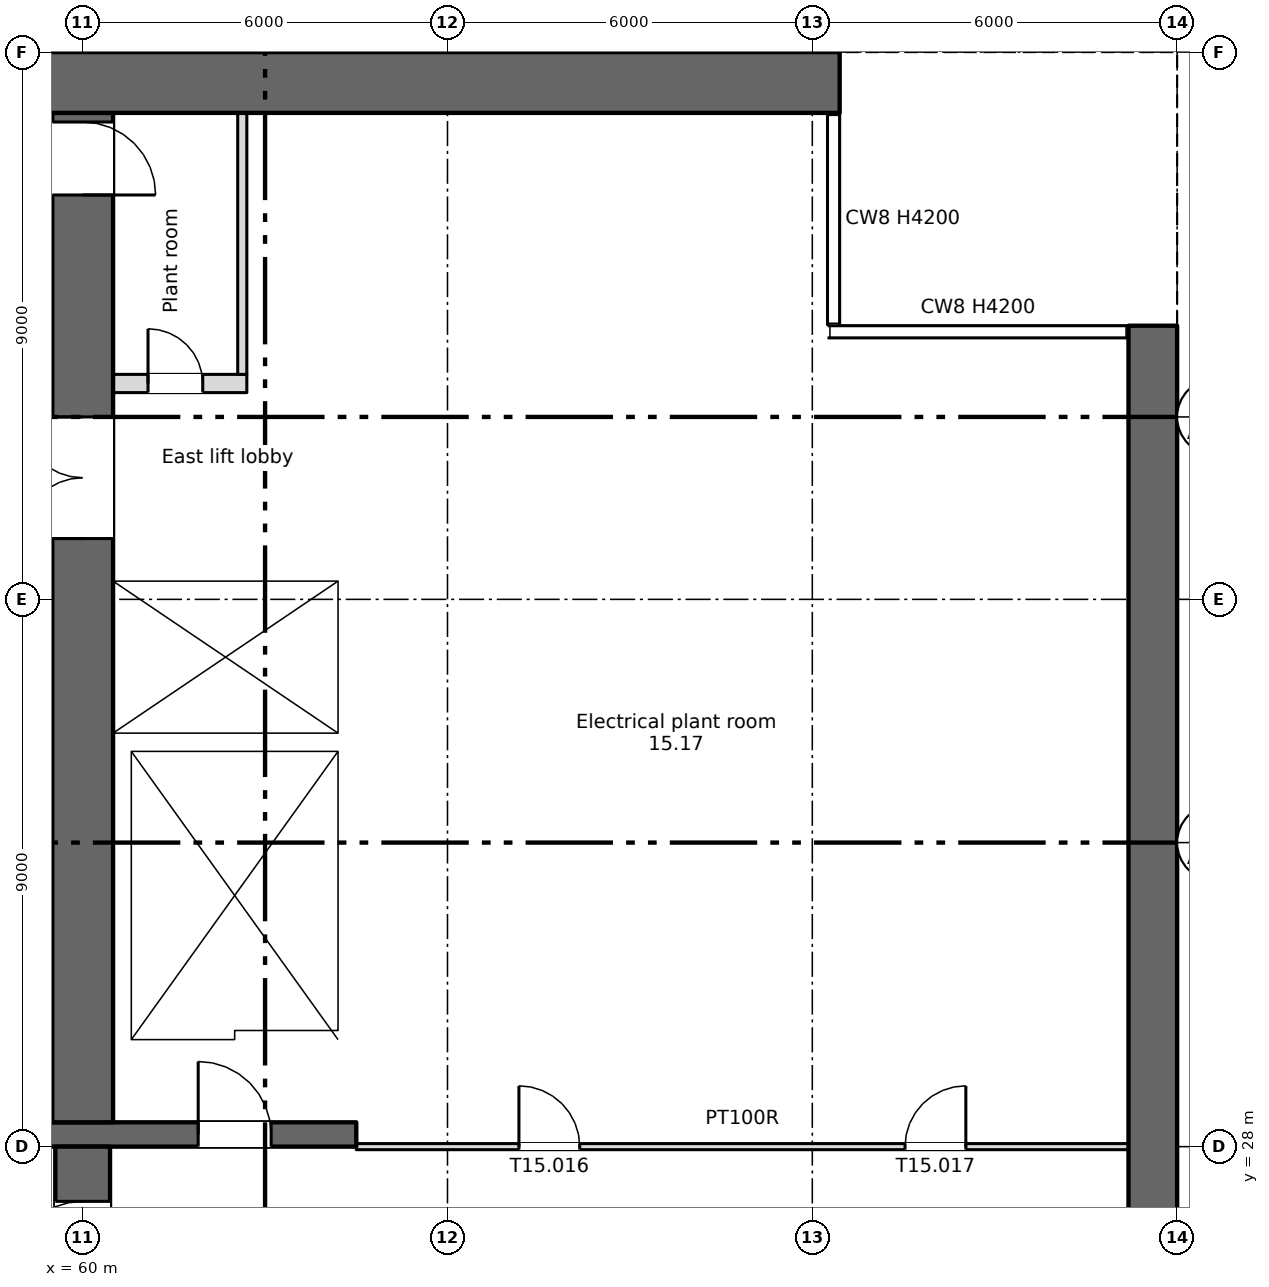
"""IFC4 building model, lengths in metres.
Left out: names, types, materials, properties, quantities, classifications, styles, units other than length and angle.
Written with IfcOpenShell. Run it as: python <this file> out.ifc"""

import sys

from ifc_helpers import new_model, si_unit, direction, frame, frame_2d, origin, place, context, subcontext, project, spatial, rectangle, extrude, element, fill, save


model = new_model("IFC4")
c1 = context("Model", 3, precision=1e-05, world=origin(), true_north=direction((0.0, 1.0)))
c2 = subcontext(c1, "Body", "Model", "MODEL_VIEW")
j1 = project(units=[si_unit("LENGTHUNIT", "METRE"), si_unit("PLANEANGLEUNIT", "RADIAN")], contexts=[c1])
p1 = place(None, origin())
s1 = spatial("IfcSite", under=j1, at=p1, CompositionType="ELEMENT")
p2 = place(p1, origin())
s2 = spatial("IfcBuilding", under=s1, at=p2, CompositionType="ELEMENT")
p3 = place(p2, frame((0.0, 0.0, 90.0)))
s3 = spatial("IfcBuildingStorey", under=s2, at=p3, CompositionType="ELEMENT", Elevation=90.0)
p4 = place(p3, frame((77.6, 4.5, 0.0), z_axis=(0.0, 0.0, 1.0), x_axis=(0.0, 1.0, 0.0)))
e1 = element("IfcWall", 1, at=p4, inside=s3, PredefinedType="SHEAR", context=c2, shape_type="SweptSolid", body=[
    extrude(rectangle(XDim=37.0, YDim=0.8, at=frame_2d((18.5, 0.0))), origin(), (0.0, 0.0, 1.0), 4.2),
])
p5 = place(p3, frame((5.55, 45.5, 0.0), z_axis=(0.0, 0.0, 1.0), x_axis=(1.0, 0.0, 0.0)))
e2 = element("IfcWall", 2, at=p5, inside=s3, PredefinedType="SHEAR", context=c2, shape_type="SweptSolid", body=[
    extrude(rectangle(XDim=66.9, YDim=1.0, at=frame_2d((33.45, 0.0))), origin(), (0.0, 0.0, 1.0), 4.2),
])
p6 = place(p3, frame((60.0, 1.4, 0.0), z_axis=(0.0, 0.0, 1.0), x_axis=(0.0, 1.0, 0.0)))
e3 = element("IfcWall", 3, at=p6, inside=s3, PredefinedType="SHEAR", context=c2, shape_type="SweptSolid", body=[
    extrude(rectangle(XDim=26.6, YDim=0.9, at=frame_2d((13.3, 0.0))), origin(), (0.0, 0.0, 1.0), 4.2),
])
p7 = place(p6, frame((24.5, 0.0, 0.0)))
e4 = element("IfcOpeningElement", 4, at=p7, cuts=e3, PredefinedType="OPENING", context=c2, shape_type="SweptSolid", body=[
    extrude(rectangle(XDim=1.2, YDim=2.1, at=frame_2d((0.6, 1.05))), frame((0.0, 0.46, 0.0), z_axis=(0.0, -1.0, 0.0), x_axis=(1.0, 0.0, 0.0)), (0.0, 0.0, 1.0), 0.92),
])
p8 = place(p3, frame((6.7, 28.2, 0.0), z_axis=(0.0, 0.0, 1.0), x_axis=(1.0, 0.0, 0.0)))
e5 = element("IfcWall", 5, at=p8, inside=s3, PredefinedType="SHEAR", context=c2, shape_type="SweptSolid", body=[
    extrude(rectangle(XDim=57.8, YDim=0.4, at=frame_2d((28.9, 0.0))), origin(), (0.0, 0.0, 1.0), 4.2),
])
p9 = place(p8, frame((13.85, 0.0, 0.0)))
e6 = element("IfcOpeningElement", 6, at=p9, cuts=e5, PredefinedType="OPENING", context=c2, shape_type="SweptSolid", body=[
    extrude(rectangle(XDim=0.9, YDim=2.1, at=frame_2d((0.45, 1.05))), frame((0.0, 0.21, 0.0), z_axis=(0.0, -1.0, 0.0), x_axis=(1.0, 0.0, 0.0)), (0.0, 0.0, 1.0), 0.42),
])
p10 = place(p8, frame((49.85, 0.0, 0.0)))
e7 = element("IfcOpeningElement", 7, at=p10, cuts=e5, PredefinedType="OPENING", context=c2, shape_type="SweptSolid", body=[
    extrude(rectangle(XDim=0.9, YDim=2.1, at=frame_2d((0.45, 1.05))), frame((0.0, 0.21, 0.0), z_axis=(0.0, -1.0, 0.0), x_axis=(1.0, 0.0, 0.0)), (0.0, 0.0, 1.0), 0.42),
])
p11 = place(p8, frame((1.35, 0.0, 0.0)))
e8 = element("IfcOpeningElement", 8, at=p11, cuts=e5, PredefinedType="OPENING", context=c2, shape_type="SweptSolid", body=[
    extrude(rectangle(XDim=0.9, YDim=2.1, at=frame_2d((0.45, 1.05))), frame((0.0, 0.21, 0.0), z_axis=(0.0, -1.0, 0.0), x_axis=(1.0, 0.0, 0.0)), (0.0, 0.0, 1.0), 0.42),
])
p12 = place(p8, frame((4.7, 0.0, 0.0)))
e9 = element("IfcOpeningElement", 9, at=p12, cuts=e5, PredefinedType="OPENING", context=c2, shape_type="SweptSolid", body=[
    extrude(rectangle(XDim=1.2, YDim=2.1, at=frame_2d((0.6, 1.05))), frame((0.0, 0.21, 0.0), z_axis=(0.0, -1.0, 0.0), x_axis=(1.0, 0.0, 0.0)), (0.0, 0.0, 1.0), 0.42),
])
p13 = place(p8, frame((31.7, 0.0, 0.0)))
e10 = element("IfcOpeningElement", 10, at=p13, cuts=e5, PredefinedType="OPENING", context=c2, shape_type="SweptSolid", body=[
    extrude(rectangle(XDim=1.2, YDim=2.1, at=frame_2d((0.6, 1.05))), frame((0.0, 0.21, 0.0), z_axis=(0.0, -1.0, 0.0), x_axis=(1.0, 0.0, 0.0)), (0.0, 0.0, 1.0), 0.42),
])
p14 = place(p8, frame((55.2, 0.0, 0.0)))
e11 = element("IfcOpeningElement", 11, at=p14, cuts=e5, PredefinedType="OPENING", context=c2, shape_type="SweptSolid", body=[
    extrude(rectangle(XDim=1.2, YDim=2.1, at=frame_2d((0.6, 1.05))), frame((0.0, 0.21, 0.0), z_axis=(0.0, -1.0, 0.0), x_axis=(1.0, 0.0, 0.0)), (0.0, 0.0, 1.0), 0.42),
])
p15 = place(p8, frame((21.7, 0.0, 0.0)))
e12 = element("IfcOpeningElement", 12, at=p15, cuts=e5, PredefinedType="OPENING", context=c2, shape_type="SweptSolid", body=[
    extrude(rectangle(XDim=1.2, YDim=2.1, at=frame_2d((0.6, 1.05))), frame((0.0, 0.21, 0.0), z_axis=(0.0, -1.0, 0.0), x_axis=(1.0, 0.0, 0.0)), (0.0, 0.0, 1.0), 0.42),
])
p16 = place(p8, frame((41.7, 0.0, 0.0)))
e13 = element("IfcOpeningElement", 13, at=p16, cuts=e5, PredefinedType="OPENING", context=c2, shape_type="SweptSolid", body=[
    extrude(rectangle(XDim=1.2, YDim=2.1, at=frame_2d((0.6, 1.05))), frame((0.0, 0.21, 0.0), z_axis=(0.0, -1.0, 0.0), x_axis=(1.0, 0.0, 0.0)), (0.0, 0.0, 1.0), 0.42),
])
p17 = place(p8, frame((24.85, 0.0, 0.0)))
e14 = element("IfcOpeningElement", 14, at=p17, cuts=e5, PredefinedType="OPENING", context=c2, shape_type="SweptSolid", body=[
    extrude(rectangle(XDim=2.4, YDim=2.1, at=frame_2d((1.2, 1.05))), frame((0.0, 0.21, 0.0), z_axis=(0.0, -1.0, 0.0), x_axis=(1.0, 0.0, 0.0)), (0.0, 0.0, 1.0), 0.42),
])
p18 = place(p8, frame((37.35, 0.0, 0.0)))
e15 = element("IfcOpeningElement", 15, at=p18, cuts=e5, PredefinedType="OPENING", context=c2, shape_type="SweptSolid", body=[
    extrude(rectangle(XDim=2.4, YDim=2.1, at=frame_2d((1.2, 1.05))), frame((0.0, 0.21, 0.0), z_axis=(0.0, -1.0, 0.0), x_axis=(1.0, 0.0, 0.0)), (0.0, 0.0, 1.0), 0.42),
])
p19 = place(p8, frame((7.85, 0.0, 0.0)))
e16 = element("IfcOpeningElement", 16, at=p19, cuts=e5, PredefinedType="OPENING", context=c2, shape_type="SweptSolid", body=[
    extrude(rectangle(XDim=2.4, YDim=2.1, at=frame_2d((1.2, 1.05))), frame((0.0, 0.21, 0.0), z_axis=(0.0, -1.0, 0.0), x_axis=(1.0, 0.0, 0.0)), (0.0, 0.0, 1.0), 0.42),
])
p20 = place(p8, frame((28.85, 0.0, 0.0)))
e17 = element("IfcOpeningElement", 17, at=p20, cuts=e5, PredefinedType="OPENING", context=c2, shape_type="SweptSolid", body=[
    extrude(rectangle(XDim=0.9, YDim=2.1, at=frame_2d((0.45, 1.05))), frame((0.0, 0.21, 0.0), z_axis=(0.0, -1.0, 0.0), x_axis=(1.0, 0.0, 0.0)), (0.0, 0.0, 1.0), 0.42),
])
p21 = place(p8, frame((34.85, 0.0, 0.0)))
e18 = element("IfcOpeningElement", 18, at=p21, cuts=e5, PredefinedType="OPENING", context=c2, shape_type="SweptSolid", body=[
    extrude(rectangle(XDim=0.9, YDim=2.1, at=frame_2d((0.45, 1.05))), frame((0.0, 0.21, 0.0), z_axis=(0.0, -1.0, 0.0), x_axis=(1.0, 0.0, 0.0)), (0.0, 0.0, 1.0), 0.42),
])
p22 = place(p3, frame((64.35, 34.8, 0.0), z_axis=(0.0, 0.0, 1.0), x_axis=(0.0, 1.0, 0.0)))
e19 = element("IfcWall", 19, at=p22, inside=s3, PredefinedType="SHEAR", context=c2, shape_type="SweptSolid", body=[
    extrude(rectangle(XDim=10.2, YDim=0.3, at=frame_2d((5.1, 0.0))), origin(), (0.0, 0.0, 1.0), 4.2),
])
p23 = place(p3, frame((60.0, 28.4, 0.0), z_axis=(0.0, 0.0, 1.0), x_axis=(0.0, 1.0, 0.0)))
e20 = element("IfcWall", 20, at=p23, inside=s3, PredefinedType="SHEAR", context=c2, shape_type="SweptSolid", body=[
    extrude(rectangle(XDim=16.6, YDim=1.0, at=frame_2d((8.3, 0.0))), origin(), (0.0, 0.0, 1.0), 4.2),
])
p24 = place(p23, frame((9.6, 0.0, 0.0)))
e21 = element("IfcOpeningElement", 21, at=p24, cuts=e20, PredefinedType="OPENING", context=c2, shape_type="SweptSolid", body=[
    extrude(rectangle(XDim=2.0, YDim=2.1, at=frame_2d((1.0, 1.05))), frame((0.0, 0.51, 0.0), z_axis=(0.0, -1.0, 0.0), x_axis=(1.0, 0.0, 0.0)), (0.0, 0.0, 1.0), 1.02),
])
p25 = place(p23, frame((15.25, 0.0, 0.0)))
e22 = element("IfcOpeningElement", 22, at=p25, cuts=e20, PredefinedType="OPENING", context=c2, shape_type="SweptSolid", body=[
    extrude(rectangle(XDim=1.2, YDim=2.1, at=frame_2d((0.6, 1.05))), frame((0.0, 0.51, 0.0), z_axis=(0.0, -1.0, 0.0), x_axis=(1.0, 0.0, 0.0)), (0.0, 0.0, 1.0), 1.02),
])
for number, where, z_axis, x_axis in (
    (23, (60.65, 28.4, 0.0), (0.0, 0.0, 1.0), (0.0, 1.0, 0.0)),
    (24, (64.35, 28.4, 0.0), (0.0, 0.0, 1.0), (0.0, 1.0, 0.0)),
):
    element("IfcWall", number, at=place(p3, frame(where, z_axis=z_axis, x_axis=x_axis)), inside=s3, PredefinedType="SHEAR", context=c2, shape_type="SweptSolid", body=[
        extrude(rectangle(XDim=6.1, YDim=0.3, at=frame_2d((3.05, 0.0))), origin(), (0.0, 0.0, 1.0), 4.2),
    ])
p26 = place(p3, frame((47.3, 34.65, 0.0), z_axis=(0.0, 0.0, 1.0), x_axis=(1.0, 0.0, 0.0)))
e25 = element("IfcWall", 25, at=p26, inside=s3, PredefinedType="SHEAR", context=c2, shape_type="SweptSolid", body=[
    extrude(rectangle(XDim=12.2, YDim=0.3, at=frame_2d((6.1, 0.0))), origin(), (0.0, 0.0, 1.0), 4.2),
])
p27 = place(p26, frame((1.3, 0.0, 0.0)))
e26 = element("IfcOpeningElement", 26, at=p27, cuts=e25, PredefinedType="OPENING", context=c2, shape_type="SweptSolid", body=[
    extrude(rectangle(XDim=1.1, YDim=2.1, at=frame_2d((0.55, 1.05))), frame((0.0, 0.16, 0.0), z_axis=(0.0, -1.0, 0.0), x_axis=(1.0, 0.0, 0.0)), (0.0, 0.0, 1.0), 0.32),
])
p28 = place(p3, frame((60.5, 34.65, 0.0), z_axis=(0.0, 0.0, 1.0), x_axis=(1.0, 0.0, 0.0)))
e27 = element("IfcWall", 27, at=p28, inside=s3, PredefinedType="SHEAR", context=c2, shape_type="SweptSolid", body=[
    extrude(rectangle(XDim=4.0, YDim=0.3, at=frame_2d((2.0, 0.0))), origin(), (0.0, 0.0, 1.0), 4.2),
])
p29 = place(p3, frame((47.3, 37.45, 0.0), z_axis=(0.0, 0.0, 1.0), x_axis=(1.0, 0.0, 0.0)))
e28 = element("IfcWall", 28, at=p29, inside=s3, PredefinedType="SHEAR", context=c2, shape_type="SweptSolid", body=[
    extrude(rectangle(XDim=12.2, YDim=0.3, at=frame_2d((6.1, 0.0))), origin(), (0.0, 0.0, 1.0), 4.2),
])
p30 = place(p29, frame((4.3, 0.0, 0.0)))
e29 = element("IfcOpeningElement", 29, at=p30, cuts=e28, PredefinedType="OPENING", context=c2, shape_type="SweptSolid", body=[
    extrude(rectangle(XDim=1.1, YDim=2.1, at=frame_2d((0.55, 1.05))), frame((0.0, 0.16, 0.0), z_axis=(0.0, -1.0, 0.0), x_axis=(1.0, 0.0, 0.0)), (0.0, 0.0, 1.0), 0.32),
])
p31 = place(p29, frame((7.3, 0.0, 0.0)))
e30 = element("IfcOpeningElement", 30, at=p31, cuts=e28, PredefinedType="OPENING", context=c2, shape_type="SweptSolid", body=[
    extrude(rectangle(XDim=1.1, YDim=2.1, at=frame_2d((0.55, 1.05))), frame((0.0, 0.16, 0.0), z_axis=(0.0, -1.0, 0.0), x_axis=(1.0, 0.0, 0.0)), (0.0, 0.0, 1.0), 0.32),
])
p32 = place(p29, frame((10.3, 0.0, 0.0)))
e31 = element("IfcOpeningElement", 31, at=p32, cuts=e28, PredefinedType="OPENING", context=c2, shape_type="SweptSolid", body=[
    extrude(rectangle(XDim=1.1, YDim=2.1, at=frame_2d((0.55, 1.05))), frame((0.0, 0.16, 0.0), z_axis=(0.0, -1.0, 0.0), x_axis=(1.0, 0.0, 0.0)), (0.0, 0.0, 1.0), 0.32),
])
p33 = place(p3, frame((60.5, 37.45, 0.0), z_axis=(0.0, 0.0, 1.0), x_axis=(1.0, 0.0, 0.0)))
e32 = element("IfcWall", 32, at=p33, inside=s3, PredefinedType="SHEAR", context=c2, shape_type="SweptSolid", body=[
    extrude(rectangle(XDim=3.7, YDim=0.3, at=frame_2d((1.85, 0.0))), origin(), (0.0, 0.0, 1.0), 4.2),
])
p34 = place(p33, frame((1.3, 0.0, 0.0)))
e33 = element("IfcOpeningElement", 33, at=p34, cuts=e32, PredefinedType="OPENING", context=c2, shape_type="SweptSolid", body=[
    extrude(rectangle(XDim=1.1, YDim=2.1, at=frame_2d((0.55, 1.05))), frame((0.0, 0.16, 0.0), z_axis=(0.0, -1.0, 0.0), x_axis=(1.0, 0.0, 0.0)), (0.0, 0.0, 1.0), 0.32),
])
p35 = place(p3, frame((60.5, 40.55, 0.0), z_axis=(0.0, 0.0, 1.0), x_axis=(1.0, 0.0, 0.0)))
e34 = element("IfcWall", 34, at=p35, inside=s3, PredefinedType="PARTITIONING", context=c2, shape_type="SweptSolid", body=[
    extrude(rectangle(XDim=2.2, YDim=0.3, at=frame_2d((1.1, 0.0))), origin(), (0.0, 0.0, 1.0), 4.2),
])
p36 = place(p35, frame((0.575, 0.0, 0.0)))
e35 = element("IfcOpeningElement", 35, at=p36, cuts=e34, PredefinedType="OPENING", context=c2, shape_type="SweptSolid", body=[
    extrude(rectangle(XDim=0.9, YDim=2.1, at=frame_2d((0.45, 1.05))), frame((0.0, 0.16, 0.0), z_axis=(0.0, -1.0, 0.0), x_axis=(1.0, 0.0, 0.0)), (0.0, 0.0, 1.0), 0.32),
])
p37 = place(p3, frame((62.625, 40.7, 0.0), z_axis=(0.0, 0.0, 1.0), x_axis=(0.0, 1.0, 0.0)))
e36 = element("IfcWall", 36, at=p37, inside=s3, PredefinedType="PARTITIONING", context=c2, shape_type="SweptSolid", body=[
    extrude(rectangle(XDim=4.3, YDim=0.15, at=frame_2d((2.15, 0.0))), origin(), (0.0, 0.0, 1.0), 4.2),
])
p38 = place(p3, frame((64.5, 28.0, 0.0), z_axis=(0.0, 0.0, 1.0), x_axis=(1.0, 0.0, 0.0)))
e37 = element("IfcWall", 37, at=p38, inside=s3, PredefinedType="PARTITIONING", context=c2, shape_type="SweptSolid", body=[
    extrude(rectangle(XDim=12.7, YDim=0.1, at=frame_2d((6.35, 0.0))), origin(), (0.0, 0.0, 1.0), 4.2),
])
p39 = place(p38, frame((2.675, 0.0, 0.0)))
e38 = element("IfcOpeningElement", 38, at=p39, cuts=e37, PredefinedType="OPENING", context=c2, shape_type="SweptSolid", body=[
    extrude(rectangle(XDim=1.0, YDim=2.1, at=frame_2d((0.5, 1.05))), frame((0.0, 0.06, 0.0), z_axis=(0.0, -1.0, 0.0), x_axis=(1.0, 0.0, 0.0)), (0.0, 0.0, 1.0), 0.12),
])
p40 = place(p38, frame((9.025, 0.0, 0.0)))
e39 = element("IfcOpeningElement", 39, at=p40, cuts=e37, PredefinedType="OPENING", context=c2, shape_type="SweptSolid", body=[
    extrude(rectangle(XDim=1.0, YDim=2.1, at=frame_2d((0.5, 1.05))), frame((0.0, 0.06, 0.0), z_axis=(0.0, -1.0, 0.0), x_axis=(1.0, 0.0, 0.0)), (0.0, 0.0, 1.0), 0.12),
])
p41 = place(p36, origin())
e40 = element("IfcDoor", 40, at=p41, inside=s3, OperationType="SINGLE_SWING_LEFT", PredefinedType="DOOR", context=c2, shape_type="SweptSolid", body=[
    extrude(rectangle(XDim=0.9, YDim=2.1, at=frame_2d((0.45, 1.05))), frame((0.0, 0.025, 0.0), z_axis=(0.0, -1.0, 0.0), x_axis=(1.0, 0.0, 0.0)), (0.0, 0.0, 1.0), 0.05),
])
fill(e35, e40)
p42 = place(p34, origin())
e41 = element("IfcDoor", 41, at=p42, inside=s3, OperationType="SLIDING_TO_LEFT", PredefinedType="DOOR", context=c2, shape_type="SweptSolid", body=[
    extrude(rectangle(XDim=1.1, YDim=2.1, at=frame_2d((0.55, 1.05))), frame((0.0, 0.025, 0.0), z_axis=(0.0, -1.0, 0.0), x_axis=(1.0, 0.0, 0.0)), (0.0, 0.0, 1.0), 0.05),
])
fill(e33, e41)
p43 = place(p14, origin())
e42 = element("IfcDoor", 42, at=p43, inside=s3, OperationType="SINGLE_SWING_LEFT", PredefinedType="DOOR", context=c2, shape_type="SweptSolid", body=[
    extrude(rectangle(XDim=1.2, YDim=2.1, at=frame_2d((0.6, 1.05))), frame((0.0, 0.025, 0.0), z_axis=(0.0, -1.0, 0.0), x_axis=(1.0, 0.0, 0.0)), (0.0, 0.0, 1.0), 0.05),
])
fill(e11, e42)
p44 = place(p24, origin())
e43 = element("IfcDoor", 43, at=p44, inside=s3, OperationType="DOUBLE_DOOR_SINGLE_SWING", PredefinedType="DOOR", context=c2, shape_type="SweptSolid", body=[
    extrude(rectangle(XDim=2.0, YDim=2.1, at=frame_2d((1.0, 1.05))), frame((0.0, 0.025, 0.0), z_axis=(0.0, -1.0, 0.0), x_axis=(1.0, 0.0, 0.0)), (0.0, 0.0, 1.0), 0.05),
])
fill(e21, e43)
p45 = place(p25, origin())
e44 = element("IfcDoor", 44, at=p45, inside=s3, OperationType="SINGLE_SWING_LEFT", PredefinedType="DOOR", context=c2, shape_type="SweptSolid", body=[
    extrude(rectangle(XDim=1.2, YDim=2.1, at=frame_2d((0.6, 1.05))), frame((0.0, 0.025, 0.0), z_axis=(0.0, -1.0, 0.0), x_axis=(1.0, 0.0, 0.0)), (0.0, 0.0, 1.0), 0.05),
])
fill(e22, e44)
p46 = place(p39, origin())
e45 = element("IfcDoor", 45, at=p46, inside=s3, OperationType="SINGLE_SWING_LEFT", PredefinedType="DOOR", context=c2, shape_type="SweptSolid", body=[
    extrude(rectangle(XDim=1.0, YDim=2.1, at=frame_2d((0.5, 1.05))), frame((0.0, 0.025, 0.0), z_axis=(0.0, -1.0, 0.0), x_axis=(1.0, 0.0, 0.0)), (0.0, 0.0, 1.0), 0.05),
])
fill(e38, e45)
p47 = place(p40, origin())
e46 = element("IfcDoor", 46, at=p47, inside=s3, OperationType="SINGLE_SWING_RIGHT", PredefinedType="DOOR", context=c2, shape_type="SweptSolid", body=[
    extrude(rectangle(XDim=1.0, YDim=2.1, at=frame_2d((0.5, 1.05))), frame((0.0, 0.025, 0.0), z_axis=(0.0, -1.0, 0.0), x_axis=(1.0, 0.0, 0.0)), (0.0, 0.0, 1.0), 0.05),
])
fill(e39, e46)
p48 = place(p7, origin())
e47 = element("IfcDoor", 47, at=p48, inside=s3, OperationType="SINGLE_SWING_LEFT", PredefinedType="DOOR", context=c2, shape_type="SweptSolid", body=[
    extrude(rectangle(XDim=1.2, YDim=2.1, at=frame_2d((0.6, 1.05))), frame((0.0, 0.025, 0.0), z_axis=(0.0, -1.0, 0.0), x_axis=(1.0, 0.0, 0.0)), (0.0, 0.0, 1.0), 0.05),
])
fill(e4, e47)
save(model, sys.argv[1])
